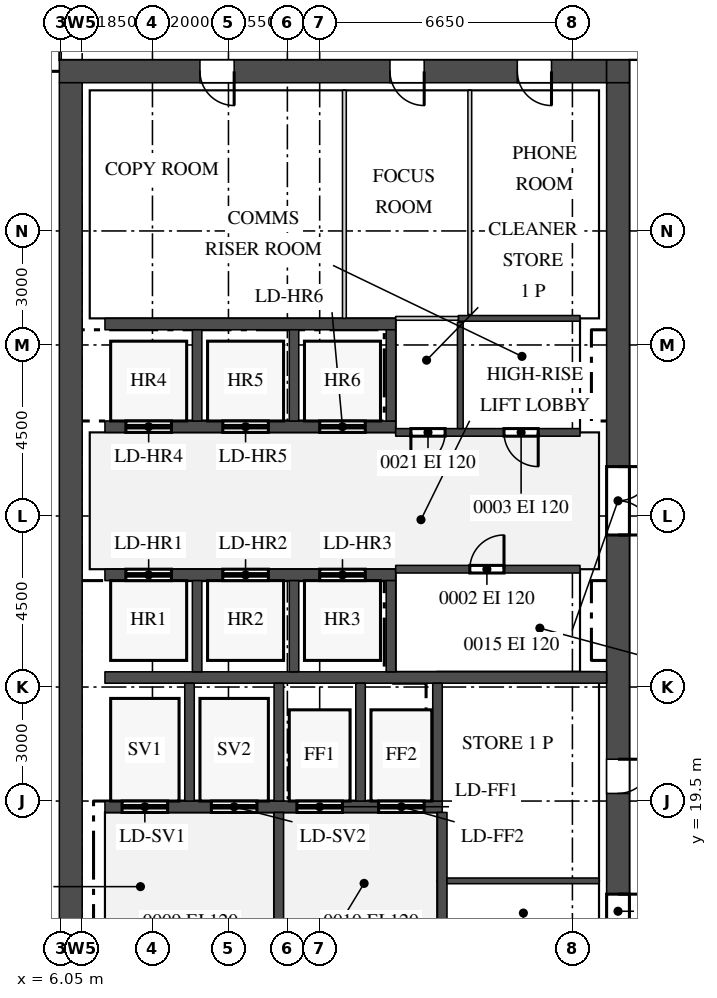
"""IFC4 building model, lengths in metres.
Left out: names, types, materials, properties, quantities, classifications, styles, units other than length and angle.
Written with IfcOpenShell. Run it as: python <this file> out.ifc"""

import sys

from ifc_helpers import new_model, si_unit, direction, frame, frame_2d, origin, place, context, subcontext, project, spatial, rectangle, extrude, source, transform, mapped, element, fill, save


model = new_model("IFC4")
c1 = context("Model", 3, precision=1e-05, world=origin(), true_north=direction((0.0, 1.0)))
c2 = subcontext(c1, "Body", "Model", "MODEL_VIEW")
j1 = project(units=[si_unit("LENGTHUNIT", "METRE"), si_unit("PLANEANGLEUNIT", "RADIAN")], contexts=[c1])
p1 = place(None, origin())
s1 = spatial("IfcSite", under=j1, at=p1, CompositionType="ELEMENT")
p2 = place(p1, origin())
s2 = spatial("IfcBuilding", under=s1, at=p2, CompositionType="ELEMENT")
p3 = place(p2, frame((0.0, 0.0, 298.2)))
s3 = spatial("IfcBuildingStorey", under=s2, at=p3, CompositionType="ELEMENT", Elevation=298.2)
m1 = source(origin(), c2, "Body", "SweptSolid", [
    extrude(rectangle(XDim=14.4, YDim=0.6, at=frame_2d((7.2, 0.0))), origin(), (0.0, 0.0, 1.0), 3.75),
])
p4 = place(p3, frame((6.0, 38.7, 0.0), z_axis=(0.0, 0.0, 1.0), x_axis=(1.0, 0.0, 0.0)))
e1 = element("IfcWall", 1, at=p4, inside=s3, PredefinedType="SHEAR", context=c2, shape_type="MappedRepresentation", body=[
    mapped(m1, transform((0.0, 0.0, 0.0))),
])
m2 = source(origin(), c2, "Body", "SweptSolid", [
    extrude(rectangle(XDim=0.9, YDim=2.1, at=frame_2d((0.45, 1.05))), frame((0.0, 0.31, 0.0), z_axis=(0.0, -1.0, 0.0), x_axis=(1.0, 0.0, 0.0)), (0.0, 0.0, 1.0), 0.62),
])
p5 = place(p4, frame((3.7, 0.0, 0.0)))
e2 = element("IfcOpeningElement", 2, at=p5, cuts=e1, PredefinedType="OPENING", context=c2, shape_type="MappedRepresentation", body=[
    mapped(m2, transform((0.0, 0.0, 0.0))),
])
p6 = place(p4, frame((8.7, 0.0, 0.0)))
e3 = element("IfcOpeningElement", 3, at=p6, cuts=e1, PredefinedType="OPENING", context=c2, shape_type="MappedRepresentation", body=[
    mapped(m2, transform((0.0, 0.0, 0.0))),
])
p7 = place(p4, frame((12.05, 0.0, 0.0)))
e4 = element("IfcOpeningElement", 4, at=p7, cuts=e1, PredefinedType="OPENING", context=c2, shape_type="MappedRepresentation", body=[
    mapped(m2, transform((0.0, 0.0, 0.0))),
])
m3 = source(origin(), c2, "Body", "SweptSolid", [
    extrude(rectangle(XDim=0.6, YDim=0.6, at=frame_2d((0.3, 0.0))), origin(), (0.0, 0.0, 1.0), 3.75),
])
p8 = place(p3, frame((20.4, 38.7, 0.0), z_axis=(0.0, 0.0, 1.0), x_axis=(1.0, 0.0, 0.0)))
e5 = element("IfcWall", 5, at=p8, inside=s3, PredefinedType="SHEAR", context=c2, shape_type="MappedRepresentation", body=[
    mapped(m3, transform((0.0, 0.0, 0.0))),
])
m4 = source(origin(), c2, "Body", "SweptSolid", [
    extrude(rectangle(XDim=22.8, YDim=0.6, at=frame_2d((11.4, 0.0))), origin(), (0.0, 0.0, 1.0), 3.75),
])
p9 = place(p3, frame((20.7, 15.6, 0.0), z_axis=(0.0, 0.0, 1.0), x_axis=(0.0, 1.0, 0.0)))
e6 = element("IfcWall", 6, at=p9, inside=s3, PredefinedType="SHEAR", context=c2, shape_type="MappedRepresentation", body=[
    mapped(m4, transform((0.0, 0.0, 0.0))),
])
m5 = source(origin(), c2, "Body", "SweptSolid", [
    extrude(rectangle(XDim=1.8, YDim=2.1, at=frame_2d((0.9, 1.05))), frame((0.0, 0.31, 0.0), z_axis=(0.0, -1.0, 0.0), x_axis=(1.0, 0.0, 0.0)), (0.0, 0.0, 1.0), 0.62),
])
p10 = place(p9, frame((10.9, 0.0, 0.0)))
e7 = element("IfcOpeningElement", 7, at=p10, cuts=e6, PredefinedType="OPENING", context=c2, shape_type="MappedRepresentation", body=[
    mapped(m5, transform((0.0, 0.0, 0.0))),
])
p11 = place(p9, frame((0.55, 0.0, 0.0)))
e8 = element("IfcOpeningElement", 8, at=p11, cuts=e6, PredefinedType="OPENING", context=c2, shape_type="MappedRepresentation", body=[
    mapped(m2, transform((0.0, 0.0, 0.0))),
])
p12 = place(p9, frame((4.1, 0.0, 0.0)))
e9 = element("IfcOpeningElement", 9, at=p12, cuts=e6, PredefinedType="OPENING", context=c2, shape_type="MappedRepresentation", body=[
    mapped(m2, transform((0.0, 0.0, 0.0))),
])
p13 = place(p3, frame((6.3, 15.6, 0.0), z_axis=(0.0, 0.0, 1.0), x_axis=(0.0, 1.0, 0.0)))
e10 = element("IfcWall", 10, at=p13, inside=s3, PredefinedType="SHEAR", context=c2, shape_type="MappedRepresentation", body=[
    mapped(m4, transform((0.0, 0.0, 0.0))),
])
m6 = source(origin(), c2, "Body", "SweptSolid", [
    extrude(rectangle(XDim=13.2, YDim=0.3, at=frame_2d((6.6, 0.0))), origin(), (0.0, 0.0, 1.0), 3.75),
])
p14 = place(p3, frame((7.2, 22.75, 0.0), z_axis=(0.0, 0.0, 1.0), x_axis=(1.0, 0.0, 0.0)))
e11 = element("IfcWall", 11, at=p14, inside=s3, PredefinedType="STANDARD", context=c2, shape_type="MappedRepresentation", body=[
    mapped(m6, transform((0.0, 0.0, 0.0))),
])
m7 = source(origin(), c2, "Body", "SweptSolid", [
    extrude(rectangle(XDim=8.875, YDim=0.3, at=frame_2d((4.438, 0.0))), origin(), (0.0, 0.0, 1.0), 3.75),
])
p15 = place(p3, frame((7.2, 19.35, 0.0), z_axis=(0.0, 0.0, 1.0), x_axis=(1.0, 0.0, 0.0)))
e12 = element("IfcWall", 12, at=p15, inside=s3, PredefinedType="STANDARD", context=c2, shape_type="MappedRepresentation", body=[
    mapped(m7, transform((0.0, 0.0, 0.0))),
])
m8 = source(origin(), c2, "Body", "SweptSolid", [
    extrude(rectangle(XDim=1.2, YDim=2.1, at=frame_2d((0.6, 1.05))), frame((0.0, 0.16, 0.0), z_axis=(0.0, -1.0, 0.0), x_axis=(1.0, 0.0, 0.0)), (0.0, 0.0, 1.0), 0.32),
])
p16 = place(p15, frame((0.45, 0.0, 0.0)))
e13 = element("IfcOpeningElement", 13, at=p16, cuts=e12, PredefinedType="OPENING", context=c2, shape_type="MappedRepresentation", body=[
    mapped(m8, transform((0.0, 0.0, 0.0))),
])
p17 = place(p15, frame((2.8, 0.0, 0.0)))
e14 = element("IfcOpeningElement", 14, at=p17, cuts=e12, PredefinedType="OPENING", context=c2, shape_type="MappedRepresentation", body=[
    mapped(m8, transform((0.0, 0.0, 0.0))),
])
p18 = place(p15, frame((5.05, 0.0, 0.0)))
e15 = element("IfcOpeningElement", 15, at=p18, cuts=e12, PredefinedType="OPENING", context=c2, shape_type="MappedRepresentation", body=[
    mapped(m8, transform((0.0, 0.0, 0.0))),
])
p19 = place(p15, frame((7.2, 0.0, 0.0)))
e16 = element("IfcOpeningElement", 16, at=p19, cuts=e12, PredefinedType="OPENING", context=c2, shape_type="MappedRepresentation", body=[
    mapped(m8, transform((0.0, 0.0, 0.0))),
])
m9 = source(origin(), c2, "Body", "SweptSolid", [
    extrude(rectangle(XDim=7.65, YDim=0.3, at=frame_2d((3.825, 0.0))), origin(), (0.0, 0.0, 1.0), 3.75),
])
p20 = place(p3, frame((7.2, 32.05, 0.0), z_axis=(0.0, 0.0, 1.0), x_axis=(1.0, 0.0, 0.0)))
e17 = element("IfcWall", 17, at=p20, inside=s3, PredefinedType="STANDARD", context=c2, shape_type="MappedRepresentation", body=[
    mapped(m9, transform((0.0, 0.0, 0.0))),
])
p21 = place(p3, frame((7.2, 29.35, 0.0), z_axis=(0.0, 0.0, 1.0), x_axis=(1.0, 0.0, 0.0)))
e18 = element("IfcWall", 18, at=p21, inside=s3, PredefinedType="STANDARD", context=c2, shape_type="MappedRepresentation", body=[
    mapped(m9, transform((0.0, 0.0, 0.0))),
])
p22 = place(p21, frame((0.55, 0.0, 0.0)))
e19 = element("IfcOpeningElement", 19, at=p22, cuts=e18, PredefinedType="OPENING", context=c2, shape_type="MappedRepresentation", body=[
    mapped(m8, transform((0.0, 0.0, 0.0))),
])
p23 = place(p21, frame((3.1, 0.0, 0.0)))
e20 = element("IfcOpeningElement", 20, at=p23, cuts=e18, PredefinedType="OPENING", context=c2, shape_type="MappedRepresentation", body=[
    mapped(m8, transform((0.0, 0.0, 0.0))),
])
p24 = place(p21, frame((5.65, 0.0, 0.0)))
e21 = element("IfcOpeningElement", 21, at=p24, cuts=e18, PredefinedType="OPENING", context=c2, shape_type="MappedRepresentation", body=[
    mapped(m8, transform((0.0, 0.0, 0.0))),
])
p25 = place(p3, frame((7.2, 25.45, 0.0), z_axis=(0.0, 0.0, 1.0), x_axis=(1.0, 0.0, 0.0)))
e22 = element("IfcWall", 22, at=p25, inside=s3, PredefinedType="STANDARD", context=c2, shape_type="MappedRepresentation", body=[
    mapped(m9, transform((0.0, 0.0, 0.0))),
])
p26 = place(p25, frame((0.55, 0.0, 0.0)))
e23 = element("IfcOpeningElement", 23, at=p26, cuts=e22, PredefinedType="OPENING", context=c2, shape_type="MappedRepresentation", body=[
    mapped(m8, transform((0.0, 0.0, 0.0))),
])
p27 = place(p25, frame((3.1, 0.0, 0.0)))
e24 = element("IfcOpeningElement", 24, at=p27, cuts=e22, PredefinedType="OPENING", context=c2, shape_type="MappedRepresentation", body=[
    mapped(m8, transform((0.0, 0.0, 0.0))),
])
p28 = place(p25, frame((5.65, 0.0, 0.0)))
e25 = element("IfcOpeningElement", 25, at=p28, cuts=e22, PredefinedType="OPENING", context=c2, shape_type="MappedRepresentation", body=[
    mapped(m8, transform((0.0, 0.0, 0.0))),
])
m10 = source(origin(), c2, "Body", "SweptSolid", [
    extrude(rectangle(XDim=3.1, YDim=0.25, at=frame_2d((1.55, 0.0))), origin(), (0.0, 0.0, 1.0), 3.75),
])
for number, where, z_axis, x_axis in (
    (26, (9.425, 19.5, 0.0), (0.0, 0.0, 1.0), (0.0, 1.0, 0.0)),
    (27, (11.775, 19.5, 0.0), (0.0, 0.0, 1.0), (0.0, 1.0, 0.0)),
    (28, (13.925, 19.5, 0.0), (0.0, 0.0, 1.0), (0.0, 1.0, 0.0)),
    (29, (15.95, 19.5, 0.0), (0.0, 0.0, 1.0), (0.0, 1.0, 0.0)),
):
    element("IfcWall", number, at=place(p3, frame(where, z_axis=z_axis, x_axis=x_axis)), inside=s3, PredefinedType="STANDARD", context=c2, shape_type="MappedRepresentation", body=[
        mapped(m10, transform((0.0, 0.0, 0.0))),
    ])
m11 = source(origin(), c2, "Body", "SweptSolid", [
    extrude(rectangle(XDim=2.4, YDim=0.25, at=frame_2d((1.2, 0.0))), origin(), (0.0, 0.0, 1.0), 3.75),
])
for number, where, z_axis, x_axis in (
    (30, (9.625, 29.5, 0.0), (0.0, 0.0, 1.0), (0.0, 1.0, 0.0)),
    (31, (12.175, 29.5, 0.0), (0.0, 0.0, 1.0), (0.0, 1.0, 0.0)),
    (32, (14.725, 29.5, 0.0), (0.0, 0.0, 1.0), (0.0, 1.0, 0.0)),
):
    element("IfcWall", number, at=place(p3, frame(where, z_axis=z_axis, x_axis=x_axis)), inside=s3, PredefinedType="STANDARD", context=c2, shape_type="MappedRepresentation", body=[
        mapped(m11, transform((0.0, 0.0, 0.0))),
    ])
m12 = source(origin(), c2, "Body", "SweptSolid", [
    extrude(rectangle(XDim=2.4, YDim=0.25, at=frame_2d((1.2, 0.0))), origin(), (0.0, 0.0, 1.0), 3.75),
])
for number, where, z_axis, x_axis in (
    (33, (9.625, 22.9, 0.0), (0.0, 0.0, 1.0), (0.0, 1.0, 0.0)),
    (34, (12.175, 22.9, 0.0), (0.0, 0.0, 1.0), (0.0, 1.0, 0.0)),
    (35, (14.725, 22.9, 0.0), (0.0, 0.0, 1.0), (0.0, 1.0, 0.0)),
):
    element("IfcWall", number, at=place(p3, frame(where, z_axis=z_axis, x_axis=x_axis)), inside=s3, PredefinedType="STANDARD", context=c2, shape_type="MappedRepresentation", body=[
        mapped(m12, transform((0.0, 0.0, 0.0))),
    ])
m13 = source(origin(), c2, "Body", "SweptSolid", [
    extrude(rectangle(XDim=3.6, YDim=0.25, at=frame_2d((1.8, 0.0))), origin(), (0.0, 0.0, 1.0), 3.75),
])
for number, where, z_axis, x_axis in (
    (36, (16.075, 15.6, 0.0), (0.0, 0.0, 1.0), (0.0, 1.0, 0.0)),
    (37, (11.775, 15.6, 0.0), (0.0, 0.0, 1.0), (0.0, 1.0, 0.0)),
):
    element("IfcWall", number, at=place(p3, frame(where, z_axis=z_axis, x_axis=x_axis)), inside=s3, PredefinedType="STANDARD", context=c2, shape_type="MappedRepresentation", body=[
        mapped(m13, transform((0.0, 0.0, 0.0))),
    ])
m14 = source(origin(), c2, "Body", "SweptSolid", [
    extrude(rectangle(XDim=4.0, YDim=0.15, at=frame_2d((2.0, 0.0))), origin(), (0.0, 0.0, 1.0), 3.8),
])
p29 = place(p3, frame((16.2, 17.4, 0.0), z_axis=(0.0, 0.0, 1.0), x_axis=(1.0, 0.0, 0.0)))
e38 = element("IfcWall", 38, at=p29, inside=s3, PredefinedType="PARTITIONING", context=c2, shape_type="MappedRepresentation", body=[
    mapped(m14, transform((0.0, 0.0, 0.0))),
])
m15 = source(origin(), c2, "Body", "SweptSolid", [
    extrude(rectangle(XDim=4.85, YDim=0.2, at=frame_2d((2.425, 0.0))), origin(), (0.0, 0.0, 1.0), 3.8),
])
p30 = place(p3, frame((14.85, 25.6, 0.0), z_axis=(0.0, 0.0, 1.0), x_axis=(1.0, 0.0, 0.0)))
e39 = element("IfcWall", 39, at=p30, inside=s3, PredefinedType="PARTITIONING", context=c2, shape_type="MappedRepresentation", body=[
    mapped(m15, transform((0.0, 0.0, 0.0))),
])
m16 = source(origin(), c2, "Body", "SweptSolid", [
    extrude(rectangle(XDim=0.9, YDim=2.1, at=frame_2d((0.45, 1.05))), frame((0.0, 0.11, 0.0), z_axis=(0.0, -1.0, 0.0), x_axis=(1.0, 0.0, 0.0)), (0.0, 0.0, 1.0), 0.22),
])
p31 = place(p30, frame((1.95, 0.0, 0.0)))
e40 = element("IfcOpeningElement", 40, at=p31, cuts=e39, PredefinedType="OPENING", context=c2, shape_type="MappedRepresentation", body=[
    mapped(m16, transform((0.0, 0.0, 0.0))),
])
p32 = place(p3, frame((14.85, 29.2, 0.0), z_axis=(0.0, 0.0, 1.0), x_axis=(1.0, 0.0, 0.0)))
e41 = element("IfcWall", 41, at=p32, inside=s3, PredefinedType="PARTITIONING", context=c2, shape_type="MappedRepresentation", body=[
    mapped(m15, transform((0.0, 0.0, 0.0))),
])
p33 = place(p32, frame((0.4, 0.0, 0.0)))
e42 = element("IfcOpeningElement", 42, at=p33, cuts=e41, PredefinedType="OPENING", context=c2, shape_type="MappedRepresentation", body=[
    mapped(m16, transform((0.0, 0.0, 0.0))),
])
p34 = place(p32, frame((2.85, 0.0, 0.0)))
e43 = element("IfcOpeningElement", 43, at=p34, cuts=e41, PredefinedType="OPENING", context=c2, shape_type="MappedRepresentation", body=[
    mapped(m16, transform((0.0, 0.0, 0.0))),
])
m17 = source(origin(), c2, "Body", "SweptSolid", [
    extrude(rectangle(XDim=2.8, YDim=0.15, at=frame_2d((1.4, 0.0))), origin(), (0.0, 0.0, 1.0), 3.8),
])
p35 = place(p3, frame((16.55, 29.3, 0.0), z_axis=(0.0, 0.0, 1.0), x_axis=(0.0, 1.0, 0.0)))
e44 = element("IfcWall", 44, at=p35, inside=s3, PredefinedType="PARTITIONING", context=c2, shape_type="MappedRepresentation", body=[
    mapped(m17, transform((0.0, 0.0, 0.0))),
])
m18 = source(origin(), c2, "Body", "SweptSolid", [
    extrude(rectangle(XDim=6.0, YDim=0.1, at=frame_2d((3.0, 0.0))), origin(), (0.0, 0.0, 1.0), 3.8),
])
p36 = place(p3, frame((13.5, 32.2, 0.0), z_axis=(0.0, 0.0, 1.0), x_axis=(0.0, 1.0, 0.0)))
e45 = element("IfcWall", 45, at=p36, inside=s3, PredefinedType="PARTITIONING", context=c2, shape_type="MappedRepresentation", body=[
    mapped(m18, transform((0.0, 0.0, 0.0))),
])
m19 = source(origin(), c2, "Body", "SweptSolid", [
    extrude(rectangle(XDim=1.65, YDim=0.1, at=frame_2d((0.825, 0.0))), origin(), (0.0, 0.0, 1.0), 3.8),
])
p37 = place(p3, frame((14.85, 32.2, 0.0), z_axis=(0.0, 0.0, 1.0), x_axis=(1.0, 0.0, 0.0)))
e46 = element("IfcWall", 46, at=p37, inside=s3, PredefinedType="PARTITIONING", context=c2, shape_type="MappedRepresentation", body=[
    mapped(m19, transform((0.0, 0.0, 0.0))),
])
m20 = source(origin(), c2, "Body", "SweptSolid", [
    extrude(rectangle(XDim=3.2, YDim=0.15, at=frame_2d((1.6, 0.0))), origin(), (0.0, 0.0, 1.0), 3.8),
])
p38 = place(p3, frame((16.5, 32.2, 0.0), z_axis=(0.0, 0.0, 1.0), x_axis=(1.0, 0.0, 0.0)))
e47 = element("IfcWall", 47, at=p38, inside=s3, PredefinedType="PARTITIONING", context=c2, shape_type="MappedRepresentation", body=[
    mapped(m20, transform((0.0, 0.0, 0.0))),
])
m21 = source(origin(), c2, "Body", "SweptSolid", [
    extrude(rectangle(XDim=5.9, YDim=0.1, at=frame_2d((2.95, 0.0))), origin(), (0.0, 0.0, 1.0), 3.8),
])
p39 = place(p3, frame((16.8, 32.3, 0.0), z_axis=(0.0, 0.0, 1.0), x_axis=(0.0, 1.0, 0.0)))
e48 = element("IfcWall", 48, at=p39, inside=s3, PredefinedType="PARTITIONING", context=c2, shape_type="MappedRepresentation", body=[
    mapped(m21, transform((0.0, 0.0, 0.0))),
])
m22 = source(origin(), c2, "Body", "SweptSolid", [
    extrude(rectangle(XDim=0.9, YDim=2.1, at=frame_2d((0.45, 1.05))), frame((0.0, 0.025, 0.0), z_axis=(0.0, -1.0, 0.0), x_axis=(1.0, 0.0, 0.0)), (0.0, 0.0, 1.0), 0.05),
])
p40 = place(p31, origin())
e49 = element("IfcDoor", 49, at=p40, inside=s3, OperationType="SINGLE_SWING_LEFT", PredefinedType="DOOR", context=c2, shape_type="MappedRepresentation", body=[
    mapped(m22, transform((0.0, 0.0, 0.0))),
])
fill(e40, e49)
p41 = place(p33, origin())
e50 = element("IfcDoor", 50, at=p41, inside=s3, OperationType="SINGLE_SWING_LEFT", PredefinedType="DOOR", context=c2, shape_type="MappedRepresentation", body=[
    mapped(m22, transform((0.0, 0.0, 0.0))),
])
fill(e42, e50)
p42 = place(p34, origin())
e51 = element("IfcDoor", 51, at=p42, inside=s3, OperationType="SINGLE_SWING_RIGHT", PredefinedType="DOOR", context=c2, shape_type="MappedRepresentation", body=[
    mapped(m22, transform((0.0, 0.0, 0.0))),
])
fill(e43, e51)
m23 = source(origin(), c2, "Body", "SweptSolid", [
    extrude(rectangle(XDim=1.8, YDim=2.1, at=frame_2d((0.9, 1.05))), frame((0.0, 0.25, 0.0), z_axis=(0.0, -1.0, 0.0), x_axis=(1.0, 0.0, 0.0)), (0.0, 0.0, 1.0), 0.5),
])
p43 = place(p10, origin())
e52 = element("IfcDoor", 52, at=p43, inside=s3, OperationType="DOUBLE_DOOR_SINGLE_SWING", PredefinedType="DOOR", context=c2, shape_type="MappedRepresentation", body=[
    mapped(m23, transform((0.0, 0.0, 0.0))),
])
fill(e7, e52)
m24 = source(origin(), c2, "Body", "SweptSolid", [
    extrude(rectangle(XDim=0.9, YDim=2.1, at=frame_2d((0.45, 1.05))), frame((0.0, 0.25, 0.0), z_axis=(0.0, -1.0, 0.0), x_axis=(1.0, 0.0, 0.0)), (0.0, 0.0, 1.0), 0.5),
])
p44 = place(p5, origin())
e53 = element("IfcDoor", 53, at=p44, inside=s3, OperationType="SINGLE_SWING_RIGHT", PredefinedType="DOOR", context=c2, shape_type="MappedRepresentation", body=[
    mapped(m24, transform((0.0, 0.0, 0.0))),
])
fill(e2, e53)
p45 = place(p6, origin())
e54 = element("IfcDoor", 54, at=p45, inside=s3, OperationType="SINGLE_SWING_RIGHT", PredefinedType="DOOR", context=c2, shape_type="MappedRepresentation", body=[
    mapped(m24, transform((0.0, 0.0, 0.0))),
])
fill(e3, e54)
p46 = place(p7, origin())
e55 = element("IfcDoor", 55, at=p46, inside=s3, OperationType="SINGLE_SWING_RIGHT", PredefinedType="DOOR", context=c2, shape_type="MappedRepresentation", body=[
    mapped(m24, transform((0.0, 0.0, 0.0))),
])
fill(e4, e55)
p47 = place(p11, origin())
e56 = element("IfcDoor", 56, at=p47, inside=s3, OperationType="SINGLE_SWING_RIGHT", PredefinedType="DOOR", context=c2, shape_type="MappedRepresentation", body=[
    mapped(m24, transform((0.0, 0.0, 0.0))),
])
fill(e8, e56)
p48 = place(p12, origin())
e57 = element("IfcDoor", 57, at=p48, inside=s3, OperationType="SINGLE_SWING_RIGHT", PredefinedType="DOOR", context=c2, shape_type="MappedRepresentation", body=[
    mapped(m24, transform((0.0, 0.0, 0.0))),
])
fill(e9, e57)
m25 = source(origin(), c2, "Body", "SweptSolid", [
    extrude(rectangle(XDim=1.2, YDim=2.1, at=frame_2d((0.6, 1.05))), frame((0.0, 0.025, 0.0), z_axis=(0.0, -1.0, 0.0), x_axis=(1.0, 0.0, 0.0)), (0.0, 0.0, 1.0), 0.05),
])
p49 = place(p26, origin())
e58 = element("IfcDoor", 58, at=p49, inside=s3, OperationType="DOUBLE_DOOR_SLIDING", PredefinedType="DOOR", context=c2, shape_type="MappedRepresentation", body=[
    mapped(m25, transform((0.0, 0.0, 0.0))),
])
fill(e23, e58)
p50 = place(p27, origin())
e59 = element("IfcDoor", 59, at=p50, inside=s3, OperationType="DOUBLE_DOOR_SLIDING", PredefinedType="DOOR", context=c2, shape_type="MappedRepresentation", body=[
    mapped(m25, transform((0.0, 0.0, 0.0))),
])
fill(e24, e59)
p51 = place(p28, origin())
e60 = element("IfcDoor", 60, at=p51, inside=s3, OperationType="DOUBLE_DOOR_SLIDING", PredefinedType="DOOR", context=c2, shape_type="MappedRepresentation", body=[
    mapped(m25, transform((0.0, 0.0, 0.0))),
])
fill(e25, e60)
p52 = place(p22, origin())
e61 = element("IfcDoor", 61, at=p52, inside=s3, OperationType="DOUBLE_DOOR_SLIDING", PredefinedType="DOOR", context=c2, shape_type="MappedRepresentation", body=[
    mapped(m25, transform((0.0, 0.0, 0.0))),
])
fill(e19, e61)
p53 = place(p23, origin())
e62 = element("IfcDoor", 62, at=p53, inside=s3, OperationType="DOUBLE_DOOR_SLIDING", PredefinedType="DOOR", context=c2, shape_type="MappedRepresentation", body=[
    mapped(m25, transform((0.0, 0.0, 0.0))),
])
fill(e20, e62)
p54 = place(p24, origin())
e63 = element("IfcDoor", 63, at=p54, inside=s3, OperationType="DOUBLE_DOOR_SLIDING", PredefinedType="DOOR", context=c2, shape_type="MappedRepresentation", body=[
    mapped(m25, transform((0.0, 0.0, 0.0))),
])
fill(e21, e63)
p55 = place(p16, origin())
e64 = element("IfcDoor", 64, at=p55, inside=s3, OperationType="DOUBLE_DOOR_SLIDING", PredefinedType="DOOR", context=c2, shape_type="MappedRepresentation", body=[
    mapped(m25, transform((0.0, 0.0, 0.0))),
])
fill(e13, e64)
p56 = place(p17, origin())
e65 = element("IfcDoor", 65, at=p56, inside=s3, OperationType="DOUBLE_DOOR_SLIDING", PredefinedType="DOOR", context=c2, shape_type="MappedRepresentation", body=[
    mapped(m25, transform((0.0, 0.0, 0.0))),
])
fill(e14, e65)
p57 = place(p18, origin())
e66 = element("IfcDoor", 66, at=p57, inside=s3, OperationType="DOUBLE_DOOR_SLIDING", PredefinedType="DOOR", context=c2, shape_type="MappedRepresentation", body=[
    mapped(m25, transform((0.0, 0.0, 0.0))),
])
fill(e15, e66)
p58 = place(p19, origin())
e67 = element("IfcDoor", 67, at=p58, inside=s3, OperationType="DOUBLE_DOOR_SLIDING", PredefinedType="DOOR", context=c2, shape_type="MappedRepresentation", body=[
    mapped(m25, transform((0.0, 0.0, 0.0))),
])
fill(e16, e67)
save(model, sys.argv[1])
